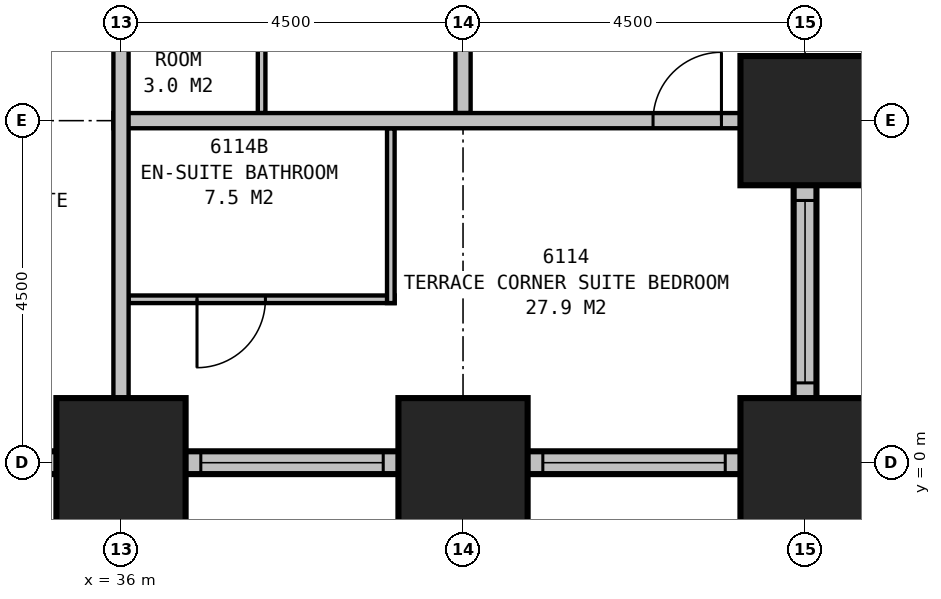
"""IFC4 building model, lengths in metres.
Left out: names, types, materials, properties, quantities, classifications, styles, units other than length and angle.
Written with IfcOpenShell. Run it as: python <this file> out.ifc"""

import sys

from ifc_helpers import new_model, si_unit, direction, frame, frame_2d, origin, origin_2d, place, context, subcontext, project, spatial, rectangle, extrude, element, fill, save


model = new_model("IFC4")
c1 = context("Model", 3, precision=1e-05, world=origin(), true_north=direction((0.0, 1.0)))
c2 = subcontext(c1, "Body", "Model", "MODEL_VIEW")
j1 = project(units=[si_unit("LENGTHUNIT", "METRE"), si_unit("PLANEANGLEUNIT", "RADIAN")], contexts=[c1])
p1 = place(None, origin())
s1 = spatial("IfcSite", under=j1, at=p1, CompositionType="ELEMENT")
p2 = place(p1, origin())
s2 = spatial("IfcBuilding", under=s1, at=p2, CompositionType="ELEMENT")
p3 = place(p2, frame((0.0, 0.0, 236.9)))
s3 = spatial("IfcBuildingStorey", under=s2, at=p3, CompositionType="ELEMENT", Elevation=236.9)
for number, where, z_axis, x_axis in (
    (1, (36.0, 0.0, 0.0), (0.0, 0.0, 1.0), (1.0, 0.0, 0.0)),
    (2, (40.5, 0.0, 0.0), (0.0, 0.0, 1.0), (1.0, 0.0, 0.0)),
    (3, (45.0, 0.0, 0.0), (0.0, 0.0, 1.0), (1.0, 0.0, 0.0)),
    (4, (45.0, 4.5, 0.0), (0.0, 0.0, 1.0), (1.0, 0.0, 0.0)),
):
    element("IfcColumn", number, at=place(p3, frame(where, z_axis=z_axis, x_axis=x_axis)), inside=s3, PredefinedType="COLUMN", context=c2, shape_type="SweptSolid", body=[
        extrude(rectangle(XDim=1.7, YDim=1.7, at=origin_2d()), origin(), (0.0, 0.0, 1.0), 3.9),
    ])
p4 = place(p3, frame((26.85, 0.0, 0.0), z_axis=(0.0, 0.0, 1.0), x_axis=(1.0, 0.0, 0.0)))
e5 = element("IfcWall", 5, at=p4, inside=s3, PredefinedType="STANDARD", context=c2, shape_type="SweptSolid", body=[
    extrude(rectangle(XDim=18.3, YDim=0.3, at=frame_2d((9.15, 0.0))), origin(), (0.0, 0.0, 1.0), 2.5),
])
p5 = place(p4, frame((1.2, 0.0, 0.5)))
e6 = element("IfcOpeningElement", 6, at=p5, cuts=e5, PredefinedType="OPENING", context=c2, shape_type="SweptSolid", body=[
    extrude(rectangle(XDim=2.4, YDim=1.85, at=frame_2d((1.2, 0.925))), frame((0.0, 0.16, 0.0), z_axis=(0.0, -1.0, 0.0), x_axis=(1.0, 0.0, 0.0)), (0.0, 0.0, 1.0), 0.32),
])
p6 = place(p4, frame((5.7, 0.0, 0.5)))
e7 = element("IfcOpeningElement", 7, at=p6, cuts=e5, PredefinedType="OPENING", context=c2, shape_type="SweptSolid", body=[
    extrude(rectangle(XDim=2.4, YDim=1.85, at=frame_2d((1.2, 0.925))), frame((0.0, 0.16, 0.0), z_axis=(0.0, -1.0, 0.0), x_axis=(1.0, 0.0, 0.0)), (0.0, 0.0, 1.0), 0.32),
])
p7 = place(p4, frame((10.2, 0.0, 0.5)))
e8 = element("IfcOpeningElement", 8, at=p7, cuts=e5, PredefinedType="OPENING", context=c2, shape_type="SweptSolid", body=[
    extrude(rectangle(XDim=2.4, YDim=1.85, at=frame_2d((1.2, 0.925))), frame((0.0, 0.16, 0.0), z_axis=(0.0, -1.0, 0.0), x_axis=(1.0, 0.0, 0.0)), (0.0, 0.0, 1.0), 0.32),
])
p8 = place(p4, frame((14.7, 0.0, 0.5)))
e9 = element("IfcOpeningElement", 9, at=p8, cuts=e5, PredefinedType="OPENING", context=c2, shape_type="SweptSolid", body=[
    extrude(rectangle(XDim=2.4, YDim=1.85, at=frame_2d((1.2, 0.925))), frame((0.0, 0.16, 0.0), z_axis=(0.0, -1.0, 0.0), x_axis=(1.0, 0.0, 0.0)), (0.0, 0.0, 1.0), 0.32),
])
p9 = place(p3, frame((45.0, -0.15, 0.0), z_axis=(0.0, 0.0, 1.0), x_axis=(0.0, 1.0, 0.0)))
e10 = element("IfcWall", 10, at=p9, inside=s3, PredefinedType="STANDARD", context=c2, shape_type="SweptSolid", body=[
    extrude(rectangle(XDim=4.8, YDim=0.3, at=frame_2d((2.4, 0.0))), origin(), (0.0, 0.0, 1.0), 2.5),
])
p10 = place(p9, frame((1.2, 0.0, 0.5)))
e11 = element("IfcOpeningElement", 11, at=p10, cuts=e10, PredefinedType="OPENING", context=c2, shape_type="SweptSolid", body=[
    extrude(rectangle(XDim=2.4, YDim=1.85, at=frame_2d((1.2, 0.925))), frame((0.0, 0.16, 0.0), z_axis=(0.0, -1.0, 0.0), x_axis=(1.0, 0.0, 0.0)), (0.0, 0.0, 1.0), 0.32),
])
p11 = place(p3, frame((44.85, 4.5, 0.0), z_axis=(0.0, 0.0, 1.0), x_axis=(1.0, 0.0, 0.0)))
e12 = element("IfcWall", 12, at=p11, inside=s3, PredefinedType="STANDARD", context=c2, shape_type="SweptSolid", body=[
    extrude(rectangle(XDim=4.3, YDim=0.3, at=frame_2d((2.15, 0.0))), origin(), (0.0, 0.0, 1.0), 2.5),
])
p12 = place(p11, frame((1.4, 0.0, 0.5)))
e13 = element("IfcOpeningElement", 13, at=p12, cuts=e12, PredefinedType="OPENING", context=c2, shape_type="SweptSolid", body=[
    extrude(rectangle(XDim=1.5, YDim=1.85, at=frame_2d((0.75, 0.925))), frame((0.0, 0.16, 0.0), z_axis=(0.0, -1.0, 0.0), x_axis=(1.0, 0.0, 0.0)), (0.0, 0.0, 1.0), 0.32),
])
p13 = place(p3, frame((49.017, 4.351, 0.0), z_axis=(0.0, 0.0, 1.0), x_axis=(-0.110433201132, 0.993883548555, 0.0)))
e14 = element("IfcWall", 14, at=p13, inside=s3, PredefinedType="STANDARD", context=c2, shape_type="SweptSolid", body=[
    extrude(rectangle(XDim=31.994, YDim=0.3, at=frame_2d((15.997, 0.0))), origin(), (0.0, 0.0, 1.0), 2.5),
])
p14 = place(p13, frame((1.664, 0.0, 0.5)))
e15 = element("IfcOpeningElement", 15, at=p14, cuts=e14, PredefinedType="OPENING", context=c2, shape_type="SweptSolid", body=[
    extrude(rectangle(XDim=1.5, YDim=1.85, at=frame_2d((0.75, 0.925))), frame((0.0, 0.16, 0.0), z_axis=(0.0, -1.0, 0.0), x_axis=(1.0, 0.0, 0.0)), (0.0, 0.0, 1.0), 0.32),
])
p15 = place(p13, frame((6.192, 0.0, 0.5)))
e16 = element("IfcOpeningElement", 16, at=p15, cuts=e14, PredefinedType="OPENING", context=c2, shape_type="SweptSolid", body=[
    extrude(rectangle(XDim=1.5, YDim=1.85, at=frame_2d((0.75, 0.925))), frame((0.0, 0.16, 0.0), z_axis=(0.0, -1.0, 0.0), x_axis=(1.0, 0.0, 0.0)), (0.0, 0.0, 1.0), 0.32),
])
p16 = place(p13, frame((10.719, 0.0, 0.5)))
e17 = element("IfcOpeningElement", 17, at=p16, cuts=e14, PredefinedType="OPENING", context=c2, shape_type="SweptSolid", body=[
    extrude(rectangle(XDim=1.5, YDim=1.85, at=frame_2d((0.75, 0.925))), frame((0.0, 0.16, 0.0), z_axis=(0.0, -1.0, 0.0), x_axis=(1.0, 0.0, 0.0)), (0.0, 0.0, 1.0), 0.32),
])
p17 = place(p13, frame((15.247, 0.0, 0.5)))
e18 = element("IfcOpeningElement", 18, at=p17, cuts=e14, PredefinedType="OPENING", context=c2, shape_type="SweptSolid", body=[
    extrude(rectangle(XDim=1.5, YDim=1.85, at=frame_2d((0.75, 0.925))), frame((0.0, 0.16, 0.0), z_axis=(0.0, -1.0, 0.0), x_axis=(1.0, 0.0, 0.0)), (0.0, 0.0, 1.0), 0.32),
])
p18 = place(p13, frame((19.775, 0.0, 0.5)))
e19 = element("IfcOpeningElement", 19, at=p18, cuts=e14, PredefinedType="OPENING", context=c2, shape_type="SweptSolid", body=[
    extrude(rectangle(XDim=1.5, YDim=1.85, at=frame_2d((0.75, 0.925))), frame((0.0, 0.16, 0.0), z_axis=(0.0, -1.0, 0.0), x_axis=(1.0, 0.0, 0.0)), (0.0, 0.0, 1.0), 0.32),
])
p19 = place(p13, frame((24.302, 0.0, 0.5)))
e20 = element("IfcOpeningElement", 20, at=p19, cuts=e14, PredefinedType="OPENING", context=c2, shape_type="SweptSolid", body=[
    extrude(rectangle(XDim=1.5, YDim=1.85, at=frame_2d((0.75, 0.925))), frame((0.0, 0.16, 0.0), z_axis=(0.0, -1.0, 0.0), x_axis=(1.0, 0.0, 0.0)), (0.0, 0.0, 1.0), 0.32),
])
p20 = place(p13, frame((28.83, 0.0, 0.5)))
e21 = element("IfcOpeningElement", 21, at=p20, cuts=e14, PredefinedType="OPENING", context=c2, shape_type="SweptSolid", body=[
    extrude(rectangle(XDim=1.5, YDim=1.85, at=frame_2d((0.75, 0.925))), frame((0.0, 0.16, 0.0), z_axis=(0.0, -1.0, 0.0), x_axis=(1.0, 0.0, 0.0)), (0.0, 0.0, 1.0), 0.32),
])
p21 = place(p3, frame((36.0, 10.6, 0.0), z_axis=(0.0, 0.0, 1.0), x_axis=(0.0, -1.0, 0.0)))
e22 = element("IfcWall", 22, at=p21, inside=s3, PredefinedType="PARTITIONING", context=c2, shape_type="SweptSolid", body=[
    extrude(rectangle(XDim=10.6, YDim=0.2, at=frame_2d((5.3, 0.0))), origin(), (0.0, 0.0, 1.0), 2.65),
])
p22 = place(p3, frame((35.9, 4.5, 0.0), z_axis=(0.0, 0.0, 1.0), x_axis=(1.0, 0.0, 0.0)))
e23 = element("IfcWall", 23, at=p22, inside=s3, PredefinedType="PARTITIONING", context=c2, shape_type="SweptSolid", body=[
    extrude(rectangle(XDim=9.1, YDim=0.2, at=frame_2d((4.55, 0.0))), origin(), (0.0, 0.0, 1.0), 3.65),
])
p23 = place(p22, frame((7.1, 0.0, 0.0)))
e24 = element("IfcOpeningElement", 24, at=p23, cuts=e23, PredefinedType="OPENING", context=c2, shape_type="SweptSolid", body=[
    extrude(rectangle(XDim=0.9, YDim=2.1, at=frame_2d((0.45, 1.05))), frame((0.0, 0.11, 0.0), z_axis=(0.0, -1.0, 0.0), x_axis=(1.0, 0.0, 0.0)), (0.0, 0.0, 1.0), 0.22),
])
p24 = place(p3, frame((40.5, 4.6, 0.0), z_axis=(0.0, 0.0, 1.0), x_axis=(0.0, 1.0, 0.0)))
e25 = element("IfcWall", 25, at=p24, inside=s3, PredefinedType="PARTITIONING", context=c2, shape_type="SweptSolid", body=[
    extrude(rectangle(XDim=8.8, YDim=0.2, at=frame_2d((4.4, 0.0))), origin(), (0.0, 0.0, 1.0), 2.65),
])
p25 = place(p24, frame((4.05, 0.0, 0.0)))
e26 = element("IfcOpeningElement", 26, at=p25, cuts=e25, PredefinedType="OPENING", context=c2, shape_type="SweptSolid", body=[
    extrude(rectangle(XDim=0.9, YDim=2.1, at=frame_2d((0.45, 1.05))), frame((0.0, 0.11, 0.0), z_axis=(0.0, -1.0, 0.0), x_axis=(1.0, 0.0, 0.0)), (0.0, 0.0, 1.0), 0.22),
])
p26 = place(p3, frame((37.85, 4.6, 0.0), z_axis=(0.0, 0.0, 1.0), x_axis=(0.0, 1.0, 0.0)))
e27 = element("IfcWall", 27, at=p26, inside=s3, PredefinedType="PLUMBINGWALL", context=c2, shape_type="SweptSolid", body=[
    extrude(rectangle(XDim=2.0, YDim=0.1, at=frame_2d((1.0, 0.0))), origin(), (0.0, 0.0, 1.0), 3.65),
])
p27 = place(p3, frame((39.55, 4.4, 0.0), z_axis=(0.0, 0.0, 1.0), x_axis=(0.0, -1.0, 0.0)))
e28 = element("IfcWall", 28, at=p27, inside=s3, PredefinedType="PLUMBINGWALL", context=c2, shape_type="SweptSolid", body=[
    extrude(rectangle(XDim=2.3, YDim=0.1, at=frame_2d((1.15, 0.0))), origin(), (0.0, 0.0, 1.0), 3.65),
])
p28 = place(p3, frame((36.1, 2.15, 0.0), z_axis=(0.0, 0.0, 1.0), x_axis=(1.0, 0.0, 0.0)))
e29 = element("IfcWall", 29, at=p28, inside=s3, PredefinedType="PLUMBINGWALL", context=c2, shape_type="SweptSolid", body=[
    extrude(rectangle(XDim=3.5, YDim=0.1, at=frame_2d((1.75, 0.0))), origin(), (0.0, 0.0, 1.0), 3.65),
])
p29 = place(p28, frame((1.8, 0.0, 0.0), z_axis=(0.0, 0.0, 1.0), x_axis=(-1.0, 0.0, 0.0)))
e30 = element("IfcOpeningElement", 30, at=p29, cuts=e29, PredefinedType="OPENING", context=c2, shape_type="SweptSolid", body=[
    extrude(rectangle(XDim=0.9, YDim=2.1, at=frame_2d((0.45, 1.05))), frame((0.0, 0.06, 0.0), z_axis=(0.0, -1.0, 0.0), x_axis=(1.0, 0.0, 0.0)), (0.0, 0.0, 1.0), 0.12),
])
p30 = place(p7, origin())
e31 = element("IfcWindow", 31, at=p30, inside=s3, PartitioningType="SINGLE_PANEL", PredefinedType="WINDOW", context=c2, shape_type="SweptSolid", body=[
    extrude(rectangle(XDim=2.4, YDim=1.85, at=frame_2d((1.2, 0.925))), frame((0.0, 0.03, 0.0), z_axis=(0.0, -1.0, 0.0), x_axis=(1.0, 0.0, 0.0)), (0.0, 0.0, 1.0), 0.06),
])
fill(e8, e31)
p31 = place(p8, origin())
e32 = element("IfcWindow", 32, at=p31, inside=s3, PartitioningType="SINGLE_PANEL", PredefinedType="WINDOW", context=c2, shape_type="SweptSolid", body=[
    extrude(rectangle(XDim=2.4, YDim=1.85, at=frame_2d((1.2, 0.925))), frame((0.0, 0.03, 0.0), z_axis=(0.0, -1.0, 0.0), x_axis=(1.0, 0.0, 0.0)), (0.0, 0.0, 1.0), 0.06),
])
fill(e9, e32)
p32 = place(p10, origin())
e33 = element("IfcWindow", 33, at=p32, inside=s3, PartitioningType="SINGLE_PANEL", PredefinedType="WINDOW", context=c2, shape_type="SweptSolid", body=[
    extrude(rectangle(XDim=2.4, YDim=1.85, at=frame_2d((1.2, 0.925))), frame((0.0, 0.03, 0.0), z_axis=(0.0, -1.0, 0.0), x_axis=(1.0, 0.0, 0.0)), (0.0, 0.0, 1.0), 0.06),
])
fill(e11, e33)
p33 = place(p23, origin())
e34 = element("IfcDoor", 34, at=p33, inside=s3, OperationType="SINGLE_SWING_RIGHT", PredefinedType="DOOR", context=c2, shape_type="SweptSolid", body=[
    extrude(rectangle(XDim=0.9, YDim=2.1, at=frame_2d((0.45, 1.05))), frame((0.0, 0.025, 0.0), z_axis=(0.0, -1.0, 0.0), x_axis=(1.0, 0.0, 0.0)), (0.0, 0.0, 1.0), 0.05),
])
fill(e24, e34)
p34 = place(p29, origin())
e35 = element("IfcDoor", 35, at=p34, inside=s3, OperationType="SINGLE_SWING_RIGHT", PredefinedType="DOOR", context=c2, shape_type="SweptSolid", body=[
    extrude(rectangle(XDim=0.9, YDim=2.1, at=frame_2d((0.45, 1.05))), frame((0.0, 0.025, 0.0), z_axis=(0.0, -1.0, 0.0), x_axis=(1.0, 0.0, 0.0)), (0.0, 0.0, 1.0), 0.05),
])
fill(e30, e35)
save(model, sys.argv[1])
